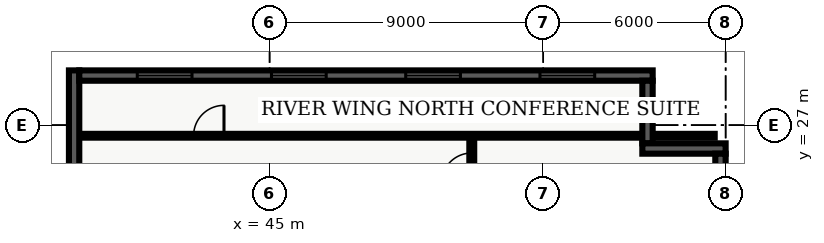
"""IFC4 building model, lengths in metres.
Left out: names, types, materials, properties, quantities, classifications, styles, units other than length and angle.
Written with IfcOpenShell. Run it as: python <this file> out.ifc"""

import sys

from ifc_helpers import new_model, entity, si_unit, converted_unit, direction, frame, origin_with_axes, origin_2d_with_axis, place, context, subcontext, project, spatial, polyline, rectangle, outline, extrude, element, fill, save


model = new_model("IFC4")
c1 = context("Model", 3, precision=1e-05, world=origin_with_axes(), true_north=direction((0.0, 1.0)))
c2 = subcontext(c1, "Body", "Model", "MODEL_VIEW")
j1 = project(units=[si_unit("LENGTHUNIT", "METRE"), converted_unit("PLANEANGLEUNIT", "DEGREE", entity("IfcPlaneAngleMeasure", 0.017), si_unit("PLANEANGLEUNIT", "RADIAN"), dimensions=[0, 0, 0, 0, 0, 0, 0])], contexts=[c1])
p1 = place(None, origin_with_axes())
s1 = spatial("IfcSite", under=j1, at=p1, CompositionType="ELEMENT")
p2 = place(p1, origin_with_axes())
s2 = spatial("IfcBuilding", under=s1, at=p2, CompositionType="ELEMENT")
p3 = place(p2, frame((0.0, 0.0, 156.3), z_axis=(0.0, 0.0, 1.0), x_axis=(1.0, 0.0, 0.0)))
s3 = spatial("IfcBuildingStorey", under=s2, at=p3, CompositionType="ELEMENT", Elevation=156.3)
p4 = place(p3, frame((51.65, 7.85, 0.0), z_axis=(0.0, 0.0, 1.0), x_axis=(0.0, 1.0, 0.0)))
e1 = element("IfcWall", 1, at=p4, inside=s3, PredefinedType="PARTITIONING", context=c2, shape_type="SweptSolid", body=[
    extrude(outline(polyline([(0.0, -0.08), (18.8, -0.08), (18.8, 0.08), (0.0, 0.08), (0.0, -0.08)])), origin_with_axes(), (0.0, 0.0, 1.0), 2.7),
])
p5 = place(p4, frame((4.559, 0.0, 0.0), z_axis=(0.0, 0.0, 1.0), x_axis=(1.0, 0.0, 0.0)))
e2 = element("IfcOpeningElement", 2, at=p5, cuts=e1, PredefinedType="OPENING", context=c2, shape_type="SweptSolid", body=[
    extrude(rectangle(XDim=1.0, YDim=0.18, at=origin_2d_with_axis()), origin_with_axes(), (0.0, 0.0, 1.0), 2.15),
])
p6 = place(p4, frame((11.523, 0.0, 0.0), z_axis=(0.0, 0.0, 1.0), x_axis=(1.0, 0.0, 0.0)))
e3 = element("IfcOpeningElement", 3, at=p6, cuts=e1, PredefinedType="OPENING", context=c2, shape_type="SweptSolid", body=[
    extrude(rectangle(XDim=1.0, YDim=0.18, at=origin_2d_with_axis()), origin_with_axes(), (0.0, 0.0, 1.0), 2.15),
])
p7 = place(p4, frame((17.733, 0.0, 0.0), z_axis=(0.0, 0.0, 1.0), x_axis=(1.0, 0.0, 0.0)))
e4 = element("IfcOpeningElement", 4, at=p7, cuts=e1, PredefinedType="OPENING", context=c2, shape_type="SweptSolid", body=[
    extrude(rectangle(XDim=1.0, YDim=0.18, at=origin_2d_with_axis()), origin_with_axes(), (0.0, 0.0, 1.0), 2.15),
])
p8 = place(p3, frame((38.735, 26.65, 0.0), z_axis=(0.0, 0.0, 1.0), x_axis=(1.0, 0.0, 0.0)))
e5 = element("IfcWall", 5, at=p8, inside=s3, PredefinedType="PARTITIONING", context=c2, shape_type="SweptSolid", body=[
    extrude(outline(polyline([(0.0, -0.062), (20.905, -0.062), (20.905, 0.062), (0.0, 0.062), (0.0, -0.062)])), origin_with_axes(), (0.0, 0.0, 1.0), 2.7),
])
p9 = place(p8, frame((4.265, 0.0, 0.0), z_axis=(0.0, 0.0, 1.0), x_axis=(1.0, 0.0, 0.0)))
e6 = element("IfcOpeningElement", 6, at=p9, cuts=e5, PredefinedType="OPENING", context=c2, shape_type="SweptSolid", body=[
    extrude(rectangle(XDim=1.0, YDim=0.145, at=origin_2d_with_axis()), origin_with_axes(), (0.0, 0.0, 1.0), 2.15),
])
p10 = place(p3, frame((38.57, 21.26, 0.0), z_axis=(0.0, 0.0, 1.0), x_axis=(0.0, 1.0, 0.0)))
e7 = element("IfcWall", 7, at=p10, inside=s3, PredefinedType="SOLIDWALL", context=c2, shape_type="SweptSolid", body=[
    extrude(outline(polyline([(0.0, -0.17), (7.54, -0.17), (7.54, 0.17), (0.0, 0.17), (0.0, -0.17)])), origin_with_axes(), (0.0, 0.0, 1.0), 3.66),
])
p11 = place(p3, frame((38.74, 28.63, 0.0), z_axis=(0.0, 0.0, 1.0), x_axis=(1.0, 0.0, 0.0)))
e8 = element("IfcWall", 8, at=p11, inside=s3, PredefinedType="SOLIDWALL", context=c2, shape_type="SweptSolid", body=[
    extrude(outline(polyline([(0.0, -0.17), (18.86, -0.17), (18.86, 0.17), (0.0, 0.17), (0.0, -0.17)])), origin_with_axes(), (0.0, 0.0, 1.0), 3.66),
])
p12 = place(p11, frame((2.808, 0.0, 0.45), z_axis=(0.0, 0.0, 1.0), x_axis=(1.0, 0.0, 0.0)))
e9 = element("IfcOpeningElement", 9, at=p12, cuts=e8, PredefinedType="OPENING", context=c2, shape_type="SweptSolid", body=[
    extrude(rectangle(XDim=1.8, YDim=0.36, at=origin_2d_with_axis()), origin_with_axes(), (0.0, 0.0, 1.0), 2.1),
])
p13 = place(p11, frame((7.222, 0.0, 0.45), z_axis=(0.0, 0.0, 1.0), x_axis=(1.0, 0.0, 0.0)))
e10 = element("IfcOpeningElement", 10, at=p13, cuts=e8, PredefinedType="OPENING", context=c2, shape_type="SweptSolid", body=[
    extrude(rectangle(XDim=1.8, YDim=0.36, at=origin_2d_with_axis()), origin_with_axes(), (0.0, 0.0, 1.0), 2.1),
])
p14 = place(p11, frame((11.637, 0.0, 0.45), z_axis=(0.0, 0.0, 1.0), x_axis=(1.0, 0.0, 0.0)))
e11 = element("IfcOpeningElement", 11, at=p14, cuts=e8, PredefinedType="OPENING", context=c2, shape_type="SweptSolid", body=[
    extrude(rectangle(XDim=1.8, YDim=0.36, at=origin_2d_with_axis()), origin_with_axes(), (0.0, 0.0, 1.0), 2.1),
])
p15 = place(p11, frame((16.053, 0.0, 0.45), z_axis=(0.0, 0.0, 1.0), x_axis=(1.0, 0.0, 0.0)))
e12 = element("IfcOpeningElement", 12, at=p15, cuts=e8, PredefinedType="OPENING", context=c2, shape_type="SweptSolid", body=[
    extrude(rectangle(XDim=1.8, YDim=0.36, at=origin_2d_with_axis()), origin_with_axes(), (0.0, 0.0, 1.0), 2.1),
])
p16 = place(p3, frame((57.43, 28.46, 0.0), z_axis=(0.0, 0.0, 1.0), x_axis=(0.0, -1.0, 0.0)))
e13 = element("IfcWall", 13, at=p16, inside=s3, PredefinedType="SOLIDWALL", context=c2, shape_type="SweptSolid", body=[
    extrude(outline(polyline([(0.0, -0.17), (2.06, -0.17), (2.06, 0.17), (0.0, 0.17), (0.0, -0.17)])), origin_with_axes(), (0.0, 0.0, 1.0), 3.66),
])
p17 = place(p3, frame((57.26, 26.23, 0.0), z_axis=(0.0, 0.0, 1.0), x_axis=(1.0, 0.0, 0.0)))
e14 = element("IfcWall", 14, at=p17, inside=s3, PredefinedType="SOLIDWALL", context=c2, shape_type="SweptSolid", body=[
    extrude(outline(polyline([(0.0, -0.17), (2.74, -0.17), (2.74, 0.17), (0.0, 0.17), (0.0, -0.17)])), origin_with_axes(), (0.0, 0.0, 1.0), 3.66),
])
p18 = place(p3, frame((59.83, 26.06, 0.0), z_axis=(0.0, 0.0, 1.0), x_axis=(0.0, -1.0, 0.0)))
e15 = element("IfcWall", 15, at=p18, inside=s3, PredefinedType="SOLIDWALL", context=c2, shape_type="SweptSolid", body=[
    extrude(outline(polyline([(0.0, -0.17), (23.66, -0.17), (23.66, 0.17), (0.0, 0.17), (0.0, -0.17)])), origin_with_axes(), (0.0, 0.0, 1.0), 3.66),
])
p19 = place(p18, frame((11.83, 0.0, 0.45), z_axis=(0.0, 0.0, 1.0), x_axis=(1.0, 0.0, 0.0)))
e16 = element("IfcOpeningElement", 16, at=p19, cuts=e15, PredefinedType="OPENING", context=c2, shape_type="SweptSolid", body=[
    extrude(rectangle(XDim=1.8, YDim=0.36, at=origin_2d_with_axis()), origin_with_axes(), (0.0, 0.0, 1.0), 2.1),
])
p20 = place(p18, frame((20.364, 0.0, 0.45), z_axis=(0.0, 0.0, 1.0), x_axis=(1.0, 0.0, 0.0)))
e17 = element("IfcOpeningElement", 17, at=p20, cuts=e15, PredefinedType="OPENING", context=c2, shape_type="SweptSolid", body=[
    extrude(rectangle(XDim=1.8, YDim=0.36, at=origin_2d_with_axis()), origin_with_axes(), (0.0, 0.0, 1.0), 2.1),
])
p21 = place(p8, frame((4.265, 0.0, 0.0), z_axis=(0.0, 0.0, 1.0), x_axis=(1.0, 0.0, 0.0)))
e18 = element("IfcDoor", 18, at=p21, inside=s3, OperationType="SINGLE_SWING_RIGHT", PredefinedType="DOOR", context=c2, shape_type="SweptSolid", body=[
    extrude(rectangle(XDim=1.0, YDim=0.075, at=origin_2d_with_axis()), origin_with_axes(), (0.0, 0.0, 1.0), 2.15),
])
fill(e6, e18)
p22 = place(p4, frame((17.733, 0.0, 0.0), z_axis=(0.0, 0.0, 1.0), x_axis=(1.0, 0.0, 0.0)))
e19 = element("IfcDoor", 19, at=p22, inside=s3, OperationType="SINGLE_SWING_LEFT", PredefinedType="DOOR", context=c2, shape_type="SweptSolid", body=[
    extrude(rectangle(XDim=1.0, YDim=0.09, at=origin_2d_with_axis()), origin_with_axes(), (0.0, 0.0, 1.0), 2.15),
])
fill(e4, e19)
p23 = place(p11, frame((2.808, 0.0, 0.45), z_axis=(0.0, 0.0, 1.0), x_axis=(1.0, 0.0, 0.0)))
e20 = element("IfcWindow", 20, at=p23, inside=s3, PredefinedType="WINDOW", context=c2, shape_type="SweptSolid", body=[
    extrude(rectangle(XDim=1.8, YDim=0.09, at=origin_2d_with_axis()), origin_with_axes(), (0.0, 0.0, 1.0), 2.1),
])
fill(e9, e20)
p24 = place(p11, frame((7.222, 0.0, 0.45), z_axis=(0.0, 0.0, 1.0), x_axis=(1.0, 0.0, 0.0)))
e21 = element("IfcWindow", 21, at=p24, inside=s3, PredefinedType="WINDOW", context=c2, shape_type="SweptSolid", body=[
    extrude(rectangle(XDim=1.8, YDim=0.09, at=origin_2d_with_axis()), origin_with_axes(), (0.0, 0.0, 1.0), 2.1),
])
fill(e10, e21)
p25 = place(p11, frame((11.637, 0.0, 0.45), z_axis=(0.0, 0.0, 1.0), x_axis=(1.0, 0.0, 0.0)))
e22 = element("IfcWindow", 22, at=p25, inside=s3, PredefinedType="WINDOW", context=c2, shape_type="SweptSolid", body=[
    extrude(rectangle(XDim=1.8, YDim=0.09, at=origin_2d_with_axis()), origin_with_axes(), (0.0, 0.0, 1.0), 2.1),
])
fill(e11, e22)
p26 = place(p11, frame((16.053, 0.0, 0.45), z_axis=(0.0, 0.0, 1.0), x_axis=(1.0, 0.0, 0.0)))
e23 = element("IfcWindow", 23, at=p26, inside=s3, PredefinedType="WINDOW", context=c2, shape_type="SweptSolid", body=[
    extrude(rectangle(XDim=1.8, YDim=0.09, at=origin_2d_with_axis()), origin_with_axes(), (0.0, 0.0, 1.0), 2.1),
])
fill(e12, e23)
save(model, sys.argv[1])
